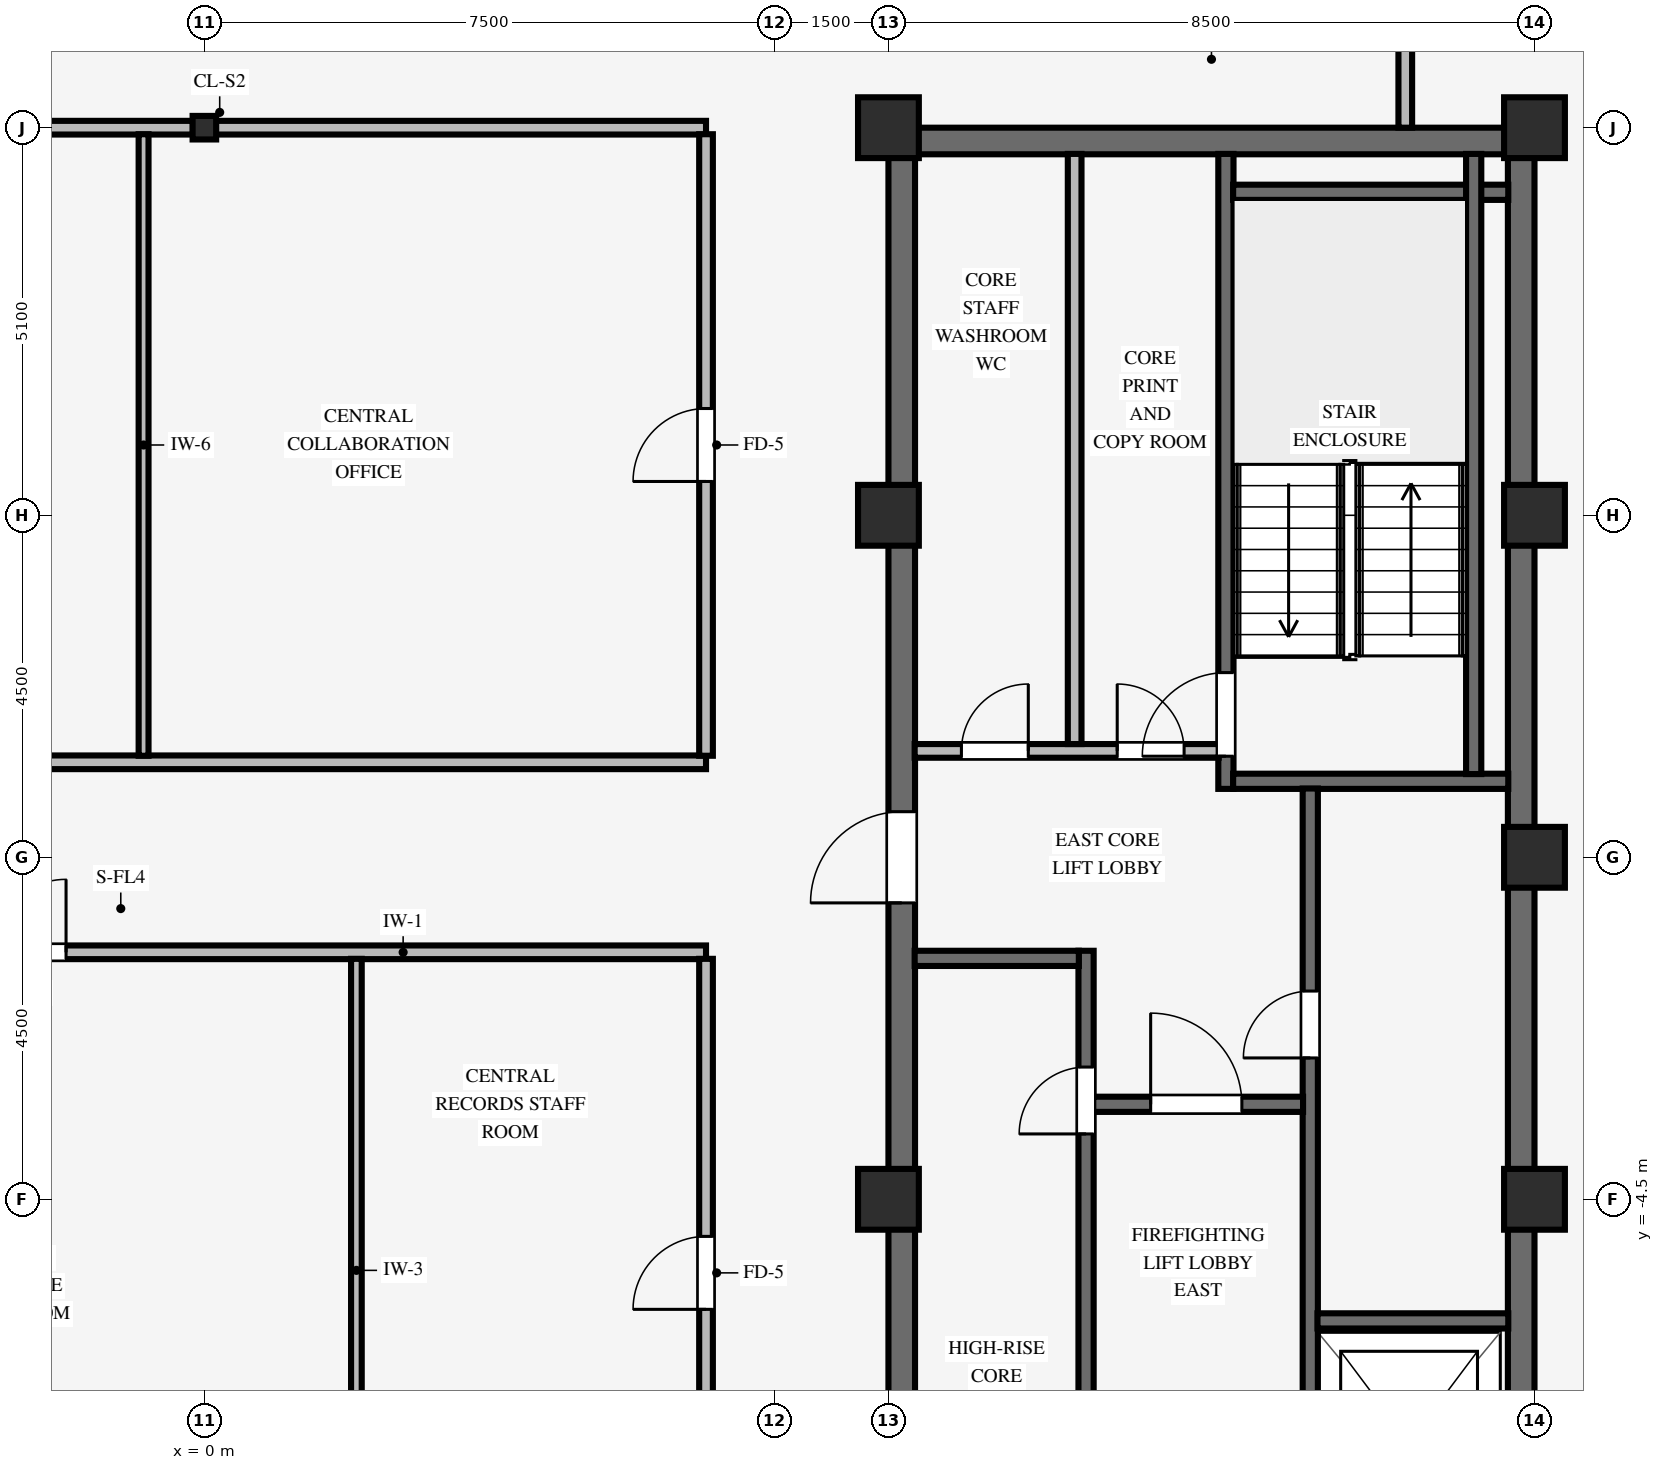
"""IFC4 building model, lengths in metres.
Left out: names, types, materials, properties, quantities, classifications, styles, units other than length and angle.
Written with IfcOpenShell. Run it as: python <this file> out.ifc"""

import sys

from ifc_helpers import new_model, si_unit, direction, frame, frame_2d, origin, origin_2d, place, context, subcontext, project, spatial, rectangle, i_section, extrude, source, transform, mapped, element, fill, save


model = new_model("IFC4")
c1 = context("Model", 3, precision=1e-05, world=origin(), true_north=direction((0.0, 1.0)))
c2 = subcontext(c1, "Body", "Model", "MODEL_VIEW")
j1 = project(units=[si_unit("LENGTHUNIT", "METRE"), si_unit("PLANEANGLEUNIT", "RADIAN")], contexts=[c1])
p1 = place(None, origin())
s1 = spatial("IfcSite", under=j1, at=p1, CompositionType="ELEMENT")
p2 = place(p1, origin())
s2 = spatial("IfcBuilding", under=s1, at=p2, CompositionType="ELEMENT")
p3 = place(p2, frame((0.0, 0.0, 276.2)))
s3 = spatial("IfcBuildingStorey", under=s2, at=p3, CompositionType="ELEMENT", Elevation=276.2)
p4 = place(p3, frame((9.0, 9.425, 0.0), z_axis=(0.0, 0.0, 1.0), x_axis=(1.0, 0.0, 0.0)))
e1 = element("IfcWall", 1, at=p4, inside=s3, PredefinedType="SHEAR", context=c2, shape_type="SweptSolid", body=[
    extrude(rectangle(XDim=8.5, YDim=0.35, at=frame_2d((4.25, 0.0))), origin(), (0.0, 0.0, 1.0), 3.37),
])
p5 = place(p3, frame((9.175, -9.255, 0.0), z_axis=(0.0, 0.0, 1.0), x_axis=(0.0, 1.0, 0.0)))
e2 = element("IfcWall", 2, at=p5, inside=s3, PredefinedType="SHEAR", context=c2, shape_type="SweptSolid", body=[
    extrude(rectangle(XDim=18.51, YDim=0.35, at=frame_2d((9.255, 0.0))), origin(), (0.0, 0.0, 1.0), 3.37),
])
p6 = place(p5, frame((8.655, 0.0, 0.0)))
e3 = element("IfcOpeningElement", 3, at=p6, cuts=e2, PredefinedType="OPENING", context=c2, shape_type="SweptSolid", body=[
    extrude(rectangle(XDim=1.2, YDim=2.15, at=frame_2d((0.6, 1.075))), frame((0.0, 0.185, 0.0), z_axis=(0.0, -1.0, 0.0), x_axis=(1.0, 0.0, 0.0)), (0.0, 0.0, 1.0), 0.37),
])
p7 = place(p3, frame((17.325, -9.255, 0.0), z_axis=(0.0, 0.0, 1.0), x_axis=(0.0, 1.0, 0.0)))
e4 = element("IfcWall", 4, at=p7, inside=s3, PredefinedType="SHEAR", context=c2, shape_type="SweptSolid", body=[
    extrude(rectangle(XDim=18.51, YDim=0.35, at=frame_2d((9.255, 0.0))), origin(), (0.0, 0.0, 1.0), 3.37),
])
for number, where, z_axis, x_axis in (
    (5, (9.0, -4.5, 0.0), (0.0, 0.0, 1.0), (1.0, 0.0, 0.0)),
    (6, (9.0, 4.5, 0.0), (0.0, 0.0, 1.0), (1.0, 0.0, 0.0)),
    (7, (9.0, 9.6, 0.0), (0.0, 0.0, 1.0), (1.0, 0.0, 0.0)),
    (8, (17.5, -4.5, 0.0), (0.0, 0.0, 1.0), (1.0, 0.0, 0.0)),
    (9, (17.5, 4.5, 0.0), (0.0, 0.0, 1.0), (1.0, 0.0, 0.0)),
    (10, (17.5, 9.6, 0.0), (0.0, 0.0, 1.0), (1.0, 0.0, 0.0)),
    (11, (17.5, 0.0, 0.0), (0.0, 0.0, 1.0), (1.0, 0.0, 0.0)),
):
    element("IfcColumn", number, at=place(p3, frame(where, z_axis=z_axis, x_axis=x_axis)), inside=s3, PredefinedType="COLUMN", context=c2, shape_type="SweptSolid", body=[
        extrude(rectangle(XDim=0.8, YDim=0.8, at=origin_2d()), origin(), (0.0, 0.0, 1.0), 3.37),
    ])
p8 = place(p3, frame((0.0, 9.6, 0.0), z_axis=(0.0, 0.0, 1.0), x_axis=(1.0, 0.0, 0.0)))
e12 = element("IfcColumn", 12, at=p8, inside=s3, PredefinedType="COLUMN", context=c2, shape_type="SweptSolid", body=[
    extrude(i_section(OverallWidth=0.31, OverallDepth=0.31, WebThickness=0.015, FlangeThickness=0.015, FilletRadius=0.015, at=origin_2d()), origin(), (0.0, 0.0, 1.0), 3.37),
])
p9 = place(p3, frame((13.44, 0.9, 0.0), z_axis=(0.0, 0.0, 1.0), x_axis=(0.0, 1.0, 0.0)))
e13 = element("IfcWall", 13, at=p9, inside=s3, PredefinedType="SHEAR", context=c2, shape_type="SweptSolid", body=[
    extrude(rectangle(XDim=8.355, YDim=0.2, at=frame_2d((4.177, 0.0))), origin(), (0.0, 0.0, 1.0), 3.37),
])
p10 = place(p9, frame((0.43, 0.0, 0.0)))
e14 = element("IfcOpeningElement", 14, at=p10, cuts=e13, PredefinedType="OPENING", context=c2, shape_type="SweptSolid", body=[
    extrude(rectangle(XDim=1.1, YDim=2.15, at=frame_2d((0.55, 1.075))), frame((0.0, 0.11, 0.0), z_axis=(0.0, -1.0, 0.0), x_axis=(1.0, 0.0, 0.0)), (0.0, 0.0, 1.0), 0.22),
])
for number, where, z_axis, x_axis in (
    (15, (13.535, 1.0, 0.0), (0.0, 0.0, 1.0), (1.0, 0.0, 0.0)),
    (16, (13.535, 8.75, 0.0), (0.0, 0.0, 1.0), (1.0, 0.0, 0.0)),
):
    element("IfcWall", number, at=place(p3, frame(where, z_axis=z_axis, x_axis=x_axis)), inside=s3, PredefinedType="SHEAR", context=c2, shape_type="SweptSolid", body=[
        extrude(rectangle(XDim=3.62, YDim=0.2, at=frame_2d((1.81, 0.0))), origin(), (0.0, 0.0, 1.0), 3.37),
    ])
p11 = place(p3, frame((16.7, 1.095, 0.0), z_axis=(0.0, 0.0, 1.0), x_axis=(0.0, 1.0, 0.0)))
e17 = element("IfcWall", 17, at=p11, inside=s3, PredefinedType="SHEAR", context=c2, shape_type="SweptSolid", body=[
    extrude(rectangle(XDim=8.16, YDim=0.2, at=frame_2d((4.08, 0.0))), origin(), (0.0, 0.0, 1.0), 3.37),
])
p12 = place(p3, frame((14.55, -9.255, 0.0), z_axis=(0.0, 0.0, 1.0), x_axis=(0.0, 1.0, 0.0)))
e18 = element("IfcWall", 18, at=p12, inside=s3, PredefinedType="SHEAR", context=c2, shape_type="SweptSolid", body=[
    extrude(rectangle(XDim=10.16, YDim=0.2, at=frame_2d((5.08, 0.0))), origin(), (0.0, 0.0, 1.0), 3.37),
])
p13 = place(p12, frame((6.615, 0.0, 0.0)))
e19 = element("IfcOpeningElement", 19, at=p13, cuts=e18, PredefinedType="OPENING", context=c2, shape_type="SweptSolid", body=[
    extrude(rectangle(XDim=0.88, YDim=2.1, at=frame_2d((0.44, 1.05))), frame((0.0, 0.11, 0.0), z_axis=(0.0, -1.0, 0.0), x_axis=(1.0, 0.0, 0.0)), (0.0, 0.0, 1.0), 0.22),
])
p14 = place(p12, frame((0.98, 0.0, 0.0)))
e20 = element("IfcOpeningElement", 20, at=p14, cuts=e18, PredefinedType="OPENING", context=c2, shape_type="SweptSolid", body=[
    extrude(rectangle(XDim=1.15, YDim=2.15, at=frame_2d((0.575, 1.075))), frame((0.0, 0.11, 0.0), z_axis=(0.0, -1.0, 0.0), x_axis=(1.0, 0.0, 0.0)), (0.0, 0.0, 1.0), 0.22),
])
p15 = place(p3, frame((14.645, -6.1, 0.0), z_axis=(0.0, 0.0, 1.0), x_axis=(1.0, 0.0, 0.0)))
e21 = element("IfcWall", 21, at=p15, inside=s3, PredefinedType="SHEAR", context=c2, shape_type="SweptSolid", body=[
    extrude(rectangle(XDim=2.51, YDim=0.2, at=frame_2d((1.255, 0.0))), origin(), (0.0, 0.0, 1.0), 3.37),
])
p16 = place(p3, frame((11.6, -9.255, 0.0), z_axis=(0.0, 0.0, 1.0), x_axis=(0.0, 1.0, 0.0)))
e22 = element("IfcWall", 22, at=p16, inside=s3, PredefinedType="SHEAR", context=c2, shape_type="SweptSolid", body=[
    extrude(rectangle(XDim=8.025, YDim=0.2, at=frame_2d((4.012, 0.0))), origin(), (0.0, 0.0, 1.0), 3.37),
])
p17 = place(p16, frame((5.615, 0.0, 0.0)))
e23 = element("IfcOpeningElement", 23, at=p17, cuts=e22, PredefinedType="OPENING", context=c2, shape_type="SweptSolid", body=[
    extrude(rectangle(XDim=0.88, YDim=2.1, at=frame_2d((0.44, 1.05))), frame((0.0, 0.11, 0.0), z_axis=(0.0, -1.0, 0.0), x_axis=(1.0, 0.0, 0.0)), (0.0, 0.0, 1.0), 0.22),
])
p18 = place(p3, frame((11.695, -3.25, 0.0), z_axis=(0.0, 0.0, 1.0), x_axis=(1.0, 0.0, 0.0)))
e24 = element("IfcWall", 24, at=p18, inside=s3, PredefinedType="SHEAR", context=c2, shape_type="SweptSolid", body=[
    extrude(rectangle(XDim=2.76, YDim=0.2, at=frame_2d((1.38, 0.0))), origin(), (0.0, 0.0, 1.0), 3.37),
])
p19 = place(p18, frame((0.755, 0.0, 0.0)))
e25 = element("IfcOpeningElement", 25, at=p19, cuts=e24, PredefinedType="OPENING", context=c2, shape_type="SweptSolid", body=[
    extrude(rectangle(XDim=1.2, YDim=2.15, at=frame_2d((0.6, 1.075))), frame((0.0, 0.11, 0.0), z_axis=(0.0, -1.0, 0.0), x_axis=(1.0, 0.0, 0.0)), (0.0, 0.0, 1.0), 0.22),
])
p20 = place(p3, frame((9.345, -1.33, 0.0), z_axis=(0.0, 0.0, 1.0), x_axis=(1.0, 0.0, 0.0)))
e26 = element("IfcWall", 26, at=p20, inside=s3, PredefinedType="SHEAR", context=c2, shape_type="SweptSolid", body=[
    extrude(rectangle(XDim=2.16, YDim=0.2, at=frame_2d((1.08, 0.0))), origin(), (0.0, 0.0, 1.0), 3.37),
])
p21 = place(p3, frame((9.345, 1.4, 0.0), z_axis=(0.0, 0.0, 1.0), x_axis=(1.0, 0.0, 0.0)))
e27 = element("IfcWall", 27, at=p21, inside=s3, PredefinedType="PARTITIONING", context=c2, shape_type="SweptSolid", body=[
    extrude(rectangle(XDim=4.0, YDim=0.18, at=frame_2d((2.0, 0.0))), origin(), (0.0, 0.0, 1.0), 3.36),
])
p22 = place(p21, frame((0.615, 0.0, 0.0)))
e28 = element("IfcOpeningElement", 28, at=p22, cuts=e27, PredefinedType="OPENING", context=c2, shape_type="SweptSolid", body=[
    extrude(rectangle(XDim=0.88, YDim=2.1, at=frame_2d((0.44, 1.05))), frame((0.0, 0.1, 0.0), z_axis=(0.0, -1.0, 0.0), x_axis=(1.0, 0.0, 0.0)), (0.0, 0.0, 1.0), 0.2),
])
p23 = place(p21, frame((2.665, 0.0, 0.0)))
e29 = element("IfcOpeningElement", 29, at=p23, cuts=e27, PredefinedType="OPENING", context=c2, shape_type="SweptSolid", body=[
    extrude(rectangle(XDim=0.88, YDim=2.1, at=frame_2d((0.44, 1.05))), frame((0.0, 0.1, 0.0), z_axis=(0.0, -1.0, 0.0), x_axis=(1.0, 0.0, 0.0)), (0.0, 0.0, 1.0), 0.2),
])
p24 = place(p3, frame((11.45, 1.49, 0.0), z_axis=(0.0, 0.0, 1.0), x_axis=(0.0, 1.0, 0.0)))
e30 = element("IfcWall", 30, at=p24, inside=s3, PredefinedType="PARTITIONING", context=c2, shape_type="SweptSolid", body=[
    extrude(rectangle(XDim=7.765, YDim=0.18, at=frame_2d((3.882, 0.0))), origin(), (0.0, 0.0, 1.0), 3.36),
])
p25 = place(p3, frame((-6.6, -1.25, 0.0), z_axis=(0.0, 0.0, 1.0), x_axis=(1.0, 0.0, 0.0)))
e31 = element("IfcWall", 31, at=p25, inside=s3, PredefinedType="PARTITIONING", context=c2, shape_type="SweptSolid", body=[
    extrude(rectangle(XDim=13.2, YDim=0.18, at=frame_2d((6.6, 0.0))), origin(), (0.0, 0.0, 1.0), 3.36),
])
p26 = place(p25, frame((3.82, 0.0, 0.0)))
e32 = element("IfcOpeningElement", 32, at=p26, cuts=e31, PredefinedType="OPENING", context=c2, shape_type="SweptSolid", body=[
    extrude(rectangle(XDim=0.96, YDim=2.1, at=frame_2d((0.48, 1.05))), frame((0.0, 0.1, 0.0), z_axis=(0.0, -1.0, 0.0), x_axis=(1.0, 0.0, 0.0)), (0.0, 0.0, 1.0), 0.2),
])
p27 = place(p3, frame((-6.6, 1.25, 0.0), z_axis=(0.0, 0.0, 1.0), x_axis=(1.0, 0.0, 0.0)))
e33 = element("IfcWall", 33, at=p27, inside=s3, PredefinedType="PARTITIONING", context=c2, shape_type="SweptSolid", body=[
    extrude(rectangle(XDim=13.2, YDim=0.18, at=frame_2d((6.6, 0.0))), origin(), (0.0, 0.0, 1.0), 3.36),
])
for number, where, z_axis, x_axis in (
    (34, (-6.6, 9.6, 0.0), (0.0, 0.0, 1.0), (1.0, 0.0, 0.0)),
    (35, (0.151, 9.6, 0.0), (0.0, 0.0, 1.0), (1.0, 0.0, 0.0)),
):
    element("IfcWall", number, at=place(p3, frame(where, z_axis=z_axis, x_axis=x_axis)), inside=s3, PredefinedType="PARTITIONING", context=c2, shape_type="SweptSolid", body=[
        extrude(rectangle(XDim=6.449, YDim=0.18, at=frame_2d((3.225, 0.0))), origin(), (0.0, 0.0, 1.0), 2.405),
    ])
p28 = place(p3, frame((-0.8, 1.336, 0.0), z_axis=(0.0, 0.0, 1.0), x_axis=(0.0, 1.0, 0.0)))
e36 = element("IfcWall", 36, at=p28, inside=s3, PredefinedType="PARTITIONING", context=c2, shape_type="SweptSolid", body=[
    extrude(rectangle(XDim=8.178, YDim=0.13, at=frame_2d((4.089, 0.0))), origin(), (0.0, 0.0, 1.0), 3.36),
])
p29 = place(p3, frame((2.0, -9.534, 0.0), z_axis=(0.0, 0.0, 1.0), x_axis=(0.0, 1.0, 0.0)))
e37 = element("IfcWall", 37, at=p29, inside=s3, PredefinedType="PARTITIONING", context=c2, shape_type="SweptSolid", body=[
    extrude(rectangle(XDim=8.198, YDim=0.14, at=frame_2d((4.099, 0.0))), origin(), (0.0, 0.0, 1.0), 3.36),
])
p30 = place(p3, frame((6.6, -19.1, 0.0), z_axis=(0.0, 0.0, 1.0), x_axis=(0.0, 1.0, 0.0)))
e38 = element("IfcWall", 38, at=p30, inside=s3, PredefinedType="PARTITIONING", context=c2, shape_type="SweptSolid", body=[
    extrude(rectangle(XDim=17.764, YDim=0.18, at=frame_2d((8.882, 0.0))), origin(), (0.0, 0.0, 1.0), 3.36),
])
p31 = place(p30, frame((13.152, 0.0, 0.0)))
e39 = element("IfcOpeningElement", 39, at=p31, cuts=e38, PredefinedType="OPENING", context=c2, shape_type="SweptSolid", body=[
    extrude(rectangle(XDim=0.96, YDim=2.1, at=frame_2d((0.48, 1.05))), frame((0.0, 0.1, 0.0), z_axis=(0.0, -1.0, 0.0), x_axis=(1.0, 0.0, 0.0)), (0.0, 0.0, 1.0), 0.2),
])
p32 = place(p30, frame((7.02, 0.0, 0.0)))
e40 = element("IfcOpeningElement", 40, at=p32, cuts=e38, PredefinedType="OPENING", context=c2, shape_type="SweptSolid", body=[
    extrude(rectangle(XDim=0.96, YDim=2.1, at=frame_2d((0.48, 1.05))), frame((0.0, 0.1, 0.0), z_axis=(0.0, -1.0, 0.0), x_axis=(1.0, 0.0, 0.0)), (0.0, 0.0, 1.0), 0.2),
])
p33 = place(p30, frame((4.12, 0.0, 0.0)))
e41 = element("IfcOpeningElement", 41, at=p33, cuts=e38, PredefinedType="OPENING", context=c2, shape_type="SweptSolid", body=[
    extrude(rectangle(XDim=0.96, YDim=2.1, at=frame_2d((0.48, 1.05))), frame((0.0, 0.1, 0.0), z_axis=(0.0, -1.0, 0.0), x_axis=(1.0, 0.0, 0.0)), (0.0, 0.0, 1.0), 0.2),
])
p34 = place(p3, frame((6.6, 1.336, 0.0), z_axis=(0.0, 0.0, 1.0), x_axis=(0.0, 1.0, 0.0)))
e42 = element("IfcWall", 42, at=p34, inside=s3, PredefinedType="PARTITIONING", context=c2, shape_type="SweptSolid", body=[
    extrude(rectangle(XDim=8.178, YDim=0.18, at=frame_2d((4.089, 0.0))), origin(), (0.0, 0.0, 1.0), 3.36),
])
p35 = place(p34, frame((3.609, 0.0, 0.0)))
e43 = element("IfcOpeningElement", 43, at=p35, cuts=e42, PredefinedType="OPENING", context=c2, shape_type="SweptSolid", body=[
    extrude(rectangle(XDim=0.96, YDim=2.1, at=frame_2d((0.48, 1.05))), frame((0.0, 0.1, 0.0), z_axis=(0.0, -1.0, 0.0), x_axis=(1.0, 0.0, 0.0)), (0.0, 0.0, 1.0), 0.2),
])
p36 = place(p3, frame((15.8, 9.6, 0.0), z_axis=(0.0, 0.0, 1.0), x_axis=(0.0, 1.0, 0.0)))
e44 = element("IfcWall", 44, at=p36, inside=s3, PredefinedType="PARTITIONING", context=c2, shape_type="SweptSolid", body=[
    extrude(rectangle(XDim=2.514, YDim=0.18, at=frame_2d((1.257, 0.0))), origin(), (0.0, 0.0, 1.0), 3.36),
])
m1 = source(origin(), c2, "Body", "SweptSolid", [
    extrude(rectangle(XDim=1.1, YDim=2.15, at=frame_2d((0.55, 1.075))), frame((0.0, 0.025, 0.0), z_axis=(0.0, -1.0, 0.0), x_axis=(1.0, 0.0, 0.0)), (0.0, 0.0, 1.0), 0.05),
])
p37 = place(p10, origin())
e45 = element("IfcDoor", 45, at=p37, inside=s3, OperationType="SINGLE_SWING_LEFT", PredefinedType="DOOR", context=c2, shape_type="MappedRepresentation", body=[
    mapped(m1, transform((0.0, 0.0, 0.0), scale=1.0)),
])
fill(e14, e45)
m2 = source(origin(), c2, "Body", "SweptSolid", [
    extrude(rectangle(XDim=0.88, YDim=2.1, at=frame_2d((0.44, 1.05))), frame((0.0, 0.025, 0.0), z_axis=(0.0, -1.0, 0.0), x_axis=(1.0, 0.0, 0.0)), (0.0, 0.0, 1.0), 0.05),
])
p38 = place(p13, origin())
e46 = element("IfcDoor", 46, at=p38, inside=s3, OperationType="SINGLE_SWING_LEFT", PredefinedType="DOOR", context=c2, shape_type="MappedRepresentation", body=[
    mapped(m2, transform((0.0, 0.0, 0.0), scale=1.0)),
])
fill(e19, e46)
m3 = source(origin(), c2, "Body", "SweptSolid", [
    extrude(rectangle(XDim=1.2, YDim=2.15, at=frame_2d((0.6, 1.075))), frame((0.0, 0.025, 0.0), z_axis=(0.0, -1.0, 0.0), x_axis=(1.0, 0.0, 0.0)), (0.0, 0.0, 1.0), 0.05),
])
p39 = place(p19, origin())
e47 = element("IfcDoor", 47, at=p39, inside=s3, OperationType="SINGLE_SWING_LEFT", PredefinedType="DOOR", context=c2, shape_type="MappedRepresentation", body=[
    mapped(m3, transform((0.0, 0.0, 0.0), scale=1.0)),
])
fill(e25, e47)
p40 = place(p17, origin())
e48 = element("IfcDoor", 48, at=p40, inside=s3, OperationType="SINGLE_SWING_LEFT", PredefinedType="DOOR", context=c2, shape_type="MappedRepresentation", body=[
    mapped(m2, transform((0.0, 0.0, 0.0), scale=1.0)),
])
fill(e23, e48)
p41 = place(p6, origin())
e49 = element("IfcDoor", 49, at=p41, inside=s3, OperationType="SINGLE_SWING_LEFT", PredefinedType="DOOR", context=c2, shape_type="MappedRepresentation", body=[
    mapped(m3, transform((0.0, 0.0, 0.0), scale=1.0)),
])
fill(e3, e49)
p42 = place(p22, origin())
e50 = element("IfcDoor", 50, at=p42, inside=s3, OperationType="SINGLE_SWING_RIGHT", PredefinedType="DOOR", context=c2, shape_type="MappedRepresentation", body=[
    mapped(m2, transform((0.0, 0.0, 0.0), scale=1.0)),
])
fill(e28, e50)
p43 = place(p23, origin())
e51 = element("IfcDoor", 51, at=p43, inside=s3, OperationType="SINGLE_SWING_LEFT", PredefinedType="DOOR", context=c2, shape_type="MappedRepresentation", body=[
    mapped(m2, transform((0.0, 0.0, 0.0), scale=1.0)),
])
fill(e29, e51)
m4 = source(origin(), c2, "Body", "SweptSolid", [
    extrude(rectangle(XDim=0.96, YDim=2.1, at=frame_2d((0.48, 1.05))), frame((0.0, 0.025, 0.0), z_axis=(0.0, -1.0, 0.0), x_axis=(1.0, 0.0, 0.0)), (0.0, 0.0, 1.0), 0.05),
])
p44 = place(p26, origin())
e52 = element("IfcDoor", 52, at=p44, inside=s3, OperationType="SINGLE_SWING_RIGHT", PredefinedType="DOOR", context=c2, shape_type="MappedRepresentation", body=[
    mapped(m4, transform((0.0, 0.0, 0.0), scale=1.0)),
])
fill(e32, e52)
p45 = place(p31, origin())
e53 = element("IfcDoor", 53, at=p45, inside=s3, OperationType="SINGLE_SWING_LEFT", PredefinedType="DOOR", context=c2, shape_type="MappedRepresentation", body=[
    mapped(m4, transform((0.0, 0.0, 0.0), scale=1.0)),
])
fill(e39, e53)
p46 = place(p35, origin())
e54 = element("IfcDoor", 54, at=p46, inside=s3, OperationType="SINGLE_SWING_LEFT", PredefinedType="DOOR", context=c2, shape_type="MappedRepresentation", body=[
    mapped(m4, transform((0.0, 0.0, 0.0), scale=1.0)),
])
fill(e43, e54)
save(model, sys.argv[1])
